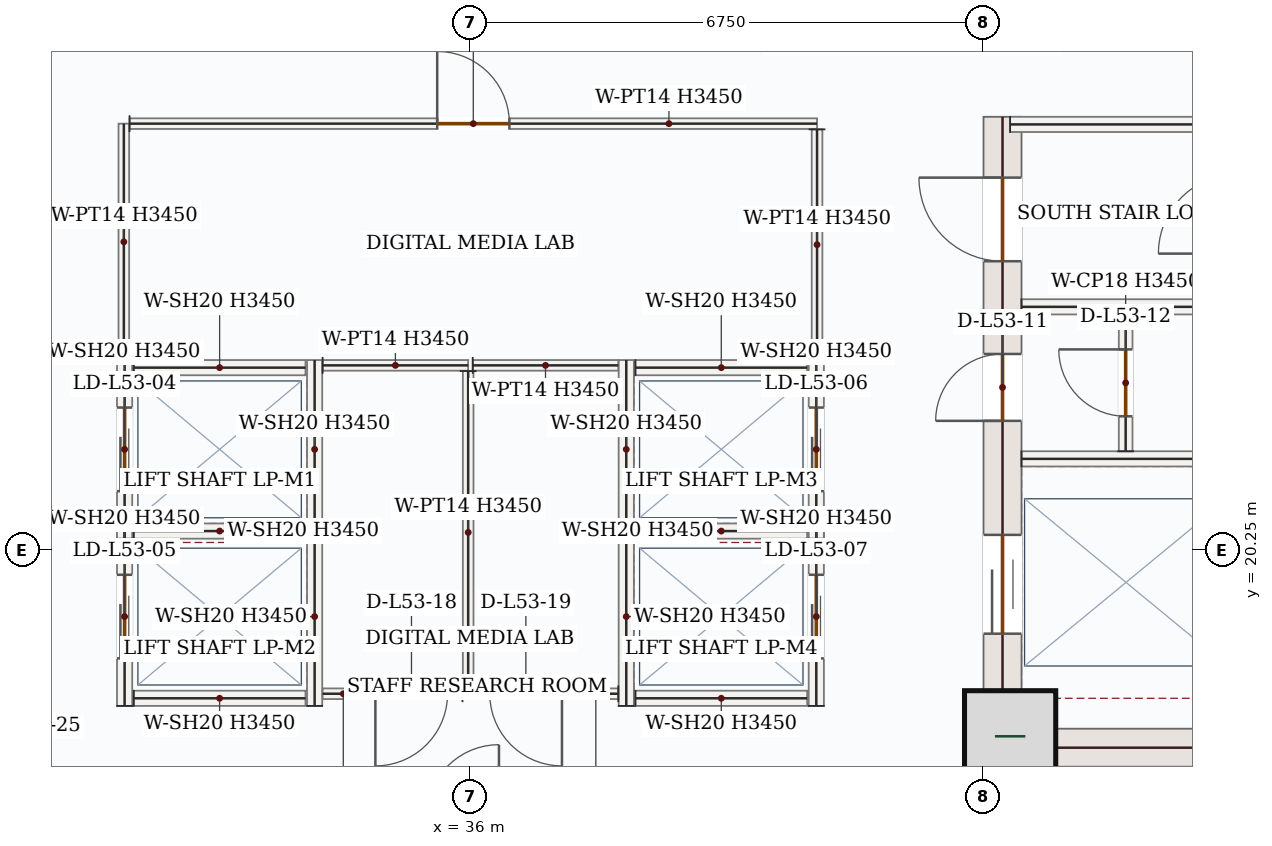
"""IFC4 building model, lengths in metres.
Left out: names, types, materials, properties, quantities, classifications, styles, units other than length and angle.
Written with IfcOpenShell. Run it as: python <this file> out.ifc"""

import sys

from ifc_helpers import new_model, si_unit, direction, frame, frame_2d, origin, origin_2d, place, context, subcontext, project, spatial, rectangle, extrude, source, transform, mapped, element, fill, save


model = new_model("IFC4")
c1 = context("Model", 3, precision=1e-05, world=origin(), true_north=direction((0.0, 1.0)))
c2 = subcontext(c1, "Body", "Model", "MODEL_VIEW")
j1 = project(units=[si_unit("LENGTHUNIT", "METRE"), si_unit("PLANEANGLEUNIT", "RADIAN")], contexts=[c1])
p1 = place(None, origin())
s1 = spatial("IfcSite", under=j1, at=p1, CompositionType="ELEMENT")
p2 = place(p1, origin())
s2 = spatial("IfcBuilding", under=s1, at=p2, CompositionType="ELEMENT")
p3 = place(p2, frame((0.0, 0.0, 225.3)))
s3 = spatial("IfcBuildingStorey", under=s2, at=p3, CompositionType="ELEMENT", Elevation=225.3)
p4 = place(p3, frame((43.0, 17.4, 0.0), z_axis=(0.0, 0.0, 1.0), x_axis=(0.0, 1.0, 0.0)))
e1 = element("IfcWall", 1, at=p4, inside=s3, PredefinedType="SHEAR", context=c2, shape_type="SweptSolid", body=[
    extrude(rectangle(XDim=8.55, YDim=0.5, at=frame_2d((4.275, 0.0))), origin(), (0.0, 0.0, 1.0), 3.45),
])
p5 = place(p4, frame((6.65, 0.0, 0.0)))
e2 = element("IfcOpeningElement", 2, at=p5, cuts=e1, PredefinedType="OPENING", context=c2, shape_type="SweptSolid", body=[
    extrude(rectangle(XDim=1.1, YDim=2.2, at=frame_2d((0.55, 1.1))), frame((0.0, 0.26, 0.0), z_axis=(0.0, -1.0, 0.0), x_axis=(1.0, 0.0, 0.0)), (0.0, 0.0, 1.0), 0.52),
])
p6 = place(p4, frame((1.75, 0.0, 0.0)))
e3 = element("IfcOpeningElement", 3, at=p6, cuts=e1, PredefinedType="OPENING", context=c2, shape_type="SweptSolid", body=[
    extrude(rectangle(XDim=1.3, YDim=2.2, at=frame_2d((0.65, 1.1))), frame((0.0, 0.26, 0.0), z_axis=(0.0, -1.0, 0.0), x_axis=(1.0, 0.0, 0.0)), (0.0, 0.0, 1.0), 0.52),
])
p7 = place(p4, frame((4.55, 0.0, 0.0)))
e4 = element("IfcOpeningElement", 4, at=p7, cuts=e1, PredefinedType="OPENING", context=c2, shape_type="SweptSolid", body=[
    extrude(rectangle(XDim=0.88, YDim=2.1, at=frame_2d((0.44, 1.05))), frame((0.0, 0.26, 0.0), z_axis=(0.0, -1.0, 0.0), x_axis=(1.0, 0.0, 0.0)), (0.0, 0.0, 1.0), 0.52),
])
m1 = source(origin(), c2, "Body", "SweptSolid", [
    extrude(rectangle(XDim=7.0, YDim=0.5, at=frame_2d((3.5, 0.0))), origin(), (0.0, 0.0, 1.0), 3.45),
])
p8 = place(p3, frame((43.25, 17.65, 0.0), z_axis=(0.0, 0.0, 1.0), x_axis=(1.0, 0.0, 0.0)))
e5 = element("IfcWall", 5, at=p8, inside=s3, PredefinedType="SHEAR", context=c2, shape_type="MappedRepresentation", body=[
    mapped(m1, transform((0.0, 0.0, 0.0), x_axis=(1.0, 0.0, 0.0), y_axis=(0.0, 1.0, 0.0), z_axis=(0.0, 0.0, 1.0), scale=1.0)),
])
m2 = source(origin(), c2, "Body", "SweptSolid", [
    extrude(rectangle(XDim=1.2, YDim=1.2, at=origin_2d()), origin(), (0.0, 0.0, 1.0), 3.9),
])
p9 = place(p3, frame((43.1, 17.8, 0.0), z_axis=(0.0, 0.0, 1.0), x_axis=(1.0, 0.0, 0.0)))
e6 = element("IfcColumn", 6, at=p9, inside=s3, PredefinedType="COLUMN", context=c2, shape_type="MappedRepresentation", body=[
    mapped(m2, transform((0.0, 0.0, 0.0), x_axis=(1.0, 0.0, 0.0), y_axis=(0.0, 1.0, 0.0), z_axis=(0.0, 0.0, 1.0), scale=1.0)),
])
m3 = source(origin(), c2, "Body", "SweptSolid", [
    extrude(rectangle(XDim=3.0, YDim=0.2, at=frame_2d((1.5, 0.0))), origin(), (0.0, 0.0, 1.0), 3.45),
])
p10 = place(p3, frame((43.1, 25.85, 0.0), z_axis=(0.0, 0.0, 1.0), x_axis=(1.0, 0.0, 0.0)))
e7 = element("IfcWall", 7, at=p10, inside=s3, PredefinedType="SOLIDWALL", context=c2, shape_type="MappedRepresentation", body=[
    mapped(m3, transform((0.0, 0.0, 0.0), x_axis=(1.0, 0.0, 0.0), y_axis=(0.0, 1.0, 0.0), z_axis=(0.0, 0.0, 1.0), scale=1.0)),
])
m4 = source(origin(), c2, "Body", "SweptSolid", [
    extrude(rectangle(XDim=2.75, YDim=0.2, at=frame_2d((1.375, 0.0))), origin(), (0.0, 0.0, 1.0), 3.45),
])
for number, where, z_axis, x_axis in (
    (8, (43.25, 23.45, 0.0), (0.0, 0.0, 1.0), (1.0, 0.0, 0.0)),
    (9, (43.25, 21.45, 0.0), (0.0, 0.0, 1.0), (1.0, 0.0, 0.0)),
):
    element("IfcWall", number, at=place(p3, frame(where, z_axis=z_axis, x_axis=x_axis)), inside=s3, PredefinedType="SOLIDWALL", context=c2, shape_type="MappedRepresentation", body=[
        mapped(m4, transform((0.0, 0.0, 0.0), x_axis=(1.0, 0.0, 0.0), y_axis=(0.0, 1.0, 0.0), z_axis=(0.0, 0.0, 1.0), scale=1.0)),
    ])
p11 = place(p3, frame((44.62, 21.55, 0.0), z_axis=(0.0, 0.0, 1.0), x_axis=(0.0, 1.0, 0.0)))
e10 = element("IfcWall", 10, at=p11, inside=s3, PredefinedType="PARTITIONING", context=c2, shape_type="SweptSolid", body=[
    extrude(rectangle(XDim=1.8, YDim=0.18, at=frame_2d((0.9, 0.0))), origin(), (0.0, 0.0, 1.0), 3.45),
])
p12 = place(p11, frame((0.46, 0.0, 0.0)))
e11 = element("IfcOpeningElement", 11, at=p12, cuts=e10, PredefinedType="OPENING", context=c2, shape_type="SweptSolid", body=[
    extrude(rectangle(XDim=0.88, YDim=2.1, at=frame_2d((0.44, 1.05))), frame((0.0, 0.1, 0.0), z_axis=(0.0, -1.0, 0.0), x_axis=(1.0, 0.0, 0.0)), (0.0, 0.0, 1.0), 0.2),
])
p13 = place(p3, frame((31.45, 20.4, 0.0), z_axis=(0.0, 0.0, 1.0), x_axis=(0.0, 1.0, 0.0)))
e12 = element("IfcWall", 12, at=p13, inside=s3, PredefinedType="SOLIDWALL", context=c2, shape_type="SweptSolid", body=[
    extrude(rectangle(XDim=2.35, YDim=0.2, at=frame_2d((1.175, 0.0))), origin(), (0.0, 0.0, 1.0), 3.45),
])
p14 = place(p13, frame((0.625, 0.0, 0.0)))
e13 = element("IfcOpeningElement", 13, at=p14, cuts=e12, PredefinedType="OPENING", context=c2, shape_type="SweptSolid", body=[
    extrude(rectangle(XDim=1.1, YDim=2.15, at=frame_2d((0.55, 1.075))), frame((0.0, 0.11, 0.0), z_axis=(0.0, -1.0, 0.0), x_axis=(1.0, 0.0, 0.0)), (0.0, 0.0, 1.0), 0.22),
])
m5 = source(origin(), c2, "Body", "SweptSolid", [
    extrude(rectangle(XDim=2.35, YDim=0.2, at=frame_2d((1.175, 0.0))), origin(), (0.0, 0.0, 1.0), 3.45),
])
p15 = place(p3, frame((33.95, 20.4, 0.0), z_axis=(0.0, 0.0, 1.0), x_axis=(0.0, 1.0, 0.0)))
e14 = element("IfcWall", 14, at=p15, inside=s3, PredefinedType="SOLIDWALL", context=c2, shape_type="MappedRepresentation", body=[
    mapped(m5, transform((0.0, 0.0, 0.0), x_axis=(1.0, 0.0, 0.0), y_axis=(0.0, 1.0, 0.0), z_axis=(0.0, 0.0, 1.0), scale=1.0)),
])
m6 = source(origin(), c2, "Body", "SweptSolid", [
    extrude(rectangle(XDim=2.26, YDim=0.2, at=frame_2d((1.13, 0.0))), origin(), (0.0, 0.0, 1.0), 3.45),
])
for number, where, z_axis, x_axis in (
    (15, (31.57, 20.5, 0.0), (0.0, 0.0, 1.0), (1.0, 0.0, 0.0)),
    (16, (31.57, 22.65, 0.0), (0.0, 0.0, 1.0), (1.0, 0.0, 0.0)),
):
    element("IfcWall", number, at=place(p3, frame(where, z_axis=z_axis, x_axis=x_axis)), inside=s3, PredefinedType="SOLIDWALL", context=c2, shape_type="MappedRepresentation", body=[
        mapped(m6, transform((0.0, 0.0, 0.0), x_axis=(1.0, 0.0, 0.0), y_axis=(0.0, 1.0, 0.0), z_axis=(0.0, 0.0, 1.0), scale=1.0)),
    ])
p16 = place(p3, frame((31.45, 18.2, 0.0), z_axis=(0.0, 0.0, 1.0), x_axis=(0.0, 1.0, 0.0)))
e17 = element("IfcWall", 17, at=p16, inside=s3, PredefinedType="SOLIDWALL", context=c2, shape_type="SweptSolid", body=[
    extrude(rectangle(XDim=2.35, YDim=0.2, at=frame_2d((1.175, 0.0))), origin(), (0.0, 0.0, 1.0), 3.45),
])
p17 = place(p16, frame((0.625, 0.0, 0.0)))
e18 = element("IfcOpeningElement", 18, at=p17, cuts=e17, PredefinedType="OPENING", context=c2, shape_type="SweptSolid", body=[
    extrude(rectangle(XDim=1.1, YDim=2.15, at=frame_2d((0.55, 1.075))), frame((0.0, 0.11, 0.0), z_axis=(0.0, -1.0, 0.0), x_axis=(1.0, 0.0, 0.0)), (0.0, 0.0, 1.0), 0.22),
])
p18 = place(p3, frame((33.95, 18.2, 0.0), z_axis=(0.0, 0.0, 1.0), x_axis=(0.0, 1.0, 0.0)))
e19 = element("IfcWall", 19, at=p18, inside=s3, PredefinedType="SOLIDWALL", context=c2, shape_type="MappedRepresentation", body=[
    mapped(m5, transform((0.0, 0.0, 0.0), x_axis=(1.0, 0.0, 0.0), y_axis=(0.0, 1.0, 0.0), z_axis=(0.0, 0.0, 1.0), scale=1.0)),
])
p19 = place(p3, frame((31.57, 18.3, 0.0), z_axis=(0.0, 0.0, 1.0), x_axis=(1.0, 0.0, 0.0)))
e20 = element("IfcWall", 20, at=p19, inside=s3, PredefinedType="SOLIDWALL", context=c2, shape_type="MappedRepresentation", body=[
    mapped(m6, transform((0.0, 0.0, 0.0), x_axis=(1.0, 0.0, 0.0), y_axis=(0.0, 1.0, 0.0), z_axis=(0.0, 0.0, 1.0), scale=1.0)),
])
p20 = place(p3, frame((38.05, 20.4, 0.0), z_axis=(0.0, 0.0, 1.0), x_axis=(0.0, 1.0, 0.0)))
e21 = element("IfcWall", 21, at=p20, inside=s3, PredefinedType="SOLIDWALL", context=c2, shape_type="MappedRepresentation", body=[
    mapped(m5, transform((0.0, 0.0, 0.0), x_axis=(1.0, 0.0, 0.0), y_axis=(0.0, 1.0, 0.0), z_axis=(0.0, 0.0, 1.0), scale=1.0)),
])
p21 = place(p3, frame((40.55, 20.4, 0.0), z_axis=(0.0, 0.0, 1.0), x_axis=(0.0, 1.0, 0.0)))
e22 = element("IfcWall", 22, at=p21, inside=s3, PredefinedType="SOLIDWALL", context=c2, shape_type="SweptSolid", body=[
    extrude(rectangle(XDim=2.35, YDim=0.2, at=frame_2d((1.175, 0.0))), origin(), (0.0, 0.0, 1.0), 3.45),
])
p22 = place(p21, frame((0.625, 0.0, 0.0)))
e23 = element("IfcOpeningElement", 23, at=p22, cuts=e22, PredefinedType="OPENING", context=c2, shape_type="SweptSolid", body=[
    extrude(rectangle(XDim=1.1, YDim=2.15, at=frame_2d((0.55, 1.075))), frame((0.0, 0.11, 0.0), z_axis=(0.0, -1.0, 0.0), x_axis=(1.0, 0.0, 0.0)), (0.0, 0.0, 1.0), 0.22),
])
for number, where, z_axis, x_axis in (
    (24, (38.17, 20.5, 0.0), (0.0, 0.0, 1.0), (1.0, 0.0, 0.0)),
    (25, (38.17, 22.65, 0.0), (0.0, 0.0, 1.0), (1.0, 0.0, 0.0)),
):
    element("IfcWall", number, at=place(p3, frame(where, z_axis=z_axis, x_axis=x_axis)), inside=s3, PredefinedType="SOLIDWALL", context=c2, shape_type="MappedRepresentation", body=[
        mapped(m6, transform((0.0, 0.0, 0.0), x_axis=(1.0, 0.0, 0.0), y_axis=(0.0, 1.0, 0.0), z_axis=(0.0, 0.0, 1.0), scale=1.0)),
    ])
p23 = place(p3, frame((38.05, 18.2, 0.0), z_axis=(0.0, 0.0, 1.0), x_axis=(0.0, 1.0, 0.0)))
e26 = element("IfcWall", 26, at=p23, inside=s3, PredefinedType="SOLIDWALL", context=c2, shape_type="MappedRepresentation", body=[
    mapped(m5, transform((0.0, 0.0, 0.0), x_axis=(1.0, 0.0, 0.0), y_axis=(0.0, 1.0, 0.0), z_axis=(0.0, 0.0, 1.0), scale=1.0)),
])
p24 = place(p3, frame((40.55, 18.2, 0.0), z_axis=(0.0, 0.0, 1.0), x_axis=(0.0, 1.0, 0.0)))
e27 = element("IfcWall", 27, at=p24, inside=s3, PredefinedType="SOLIDWALL", context=c2, shape_type="SweptSolid", body=[
    extrude(rectangle(XDim=2.35, YDim=0.2, at=frame_2d((1.175, 0.0))), origin(), (0.0, 0.0, 1.0), 3.45),
])
p25 = place(p24, frame((0.625, 0.0, 0.0)))
e28 = element("IfcOpeningElement", 28, at=p25, cuts=e27, PredefinedType="OPENING", context=c2, shape_type="SweptSolid", body=[
    extrude(rectangle(XDim=1.1, YDim=2.15, at=frame_2d((0.55, 1.075))), frame((0.0, 0.11, 0.0), z_axis=(0.0, -1.0, 0.0), x_axis=(1.0, 0.0, 0.0)), (0.0, 0.0, 1.0), 0.22),
])
p26 = place(p3, frame((38.17, 18.3, 0.0), z_axis=(0.0, 0.0, 1.0), x_axis=(1.0, 0.0, 0.0)))
e29 = element("IfcWall", 29, at=p26, inside=s3, PredefinedType="SOLIDWALL", context=c2, shape_type="MappedRepresentation", body=[
    mapped(m6, transform((0.0, 0.0, 0.0), x_axis=(1.0, 0.0, 0.0), y_axis=(0.0, 1.0, 0.0), z_axis=(0.0, 0.0, 1.0), scale=1.0)),
])
m7 = source(origin(), c2, "Body", "SweptSolid", [
    extrude(rectangle(XDim=1.915, YDim=0.14, at=frame_2d((0.958, 0.0))), origin(), (0.0, 0.0, 1.0), 3.45),
])
p27 = place(p3, frame((34.055, 22.68, 0.0), z_axis=(0.0, 0.0, 1.0), x_axis=(1.0, 0.0, 0.0)))
e30 = element("IfcWall", 30, at=p27, inside=s3, PredefinedType="PARTITIONING", context=c2, shape_type="MappedRepresentation", body=[
    mapped(m7, transform((0.0, 0.0, 0.0), x_axis=(1.0, 0.0, 0.0), y_axis=(0.0, 1.0, 0.0), z_axis=(0.0, 0.0, 1.0), scale=1.0)),
])
m8 = source(origin(), c2, "Body", "SweptSolid", [
    extrude(rectangle(XDim=4.245, YDim=0.14, at=frame_2d((2.123, 0.0))), origin(), (0.0, 0.0, 1.0), 3.45),
])
p28 = place(p3, frame((35.97, 22.605, 0.0), z_axis=(0.0, 0.0, 1.0), x_axis=(0.0, -1.0, 0.0)))
e31 = element("IfcWall", 31, at=p28, inside=s3, PredefinedType="PARTITIONING", context=c2, shape_type="MappedRepresentation", body=[
    mapped(m8, transform((0.0, 0.0, 0.0), x_axis=(1.0, 0.0, 0.0), y_axis=(0.0, 1.0, 0.0), z_axis=(0.0, 0.0, 1.0), scale=1.0)),
])
p29 = place(p3, frame((35.895, 18.36, 0.0), z_axis=(0.0, 0.0, 1.0), x_axis=(-1.0, 0.0, 0.0)))
e32 = element("IfcWall", 32, at=p29, inside=s3, PredefinedType="PARTITIONING", context=c2, shape_type="SweptSolid", body=[
    extrude(rectangle(XDim=1.84, YDim=0.14, at=frame_2d((0.92, 0.0))), origin(), (0.0, 0.0, 1.0), 3.45),
])
p30 = place(p29, frame((0.196, 0.0, 0.0)))
e33 = element("IfcOpeningElement", 33, at=p30, cuts=e32, PredefinedType="OPENING", context=c2, shape_type="SweptSolid", body=[
    extrude(rectangle(XDim=0.95, YDim=2.15, at=frame_2d((0.475, 1.075))), frame((0.0, 0.08, 0.0), z_axis=(0.0, -1.0, 0.0), x_axis=(1.0, 0.0, 0.0)), (0.0, 0.0, 1.0), 0.16),
])
p31 = place(p3, frame((36.03, 22.68, 0.0), z_axis=(0.0, 0.0, 1.0), x_axis=(1.0, 0.0, 0.0)))
e34 = element("IfcWall", 34, at=p31, inside=s3, PredefinedType="PARTITIONING", context=c2, shape_type="MappedRepresentation", body=[
    mapped(m7, transform((0.0, 0.0, 0.0), x_axis=(1.0, 0.0, 0.0), y_axis=(0.0, 1.0, 0.0), z_axis=(0.0, 0.0, 1.0), scale=1.0)),
])
p32 = place(p3, frame((37.945, 18.36, 0.0), z_axis=(0.0, 0.0, 1.0), x_axis=(-1.0, 0.0, 0.0)))
e35 = element("IfcWall", 35, at=p32, inside=s3, PredefinedType="PARTITIONING", context=c2, shape_type="SweptSolid", body=[
    extrude(rectangle(XDim=1.9, YDim=0.14, at=frame_2d((0.95, 0.0))), origin(), (0.0, 0.0, 1.0), 3.45),
])
p33 = place(p32, frame((0.741, 0.0, 0.0)))
e36 = element("IfcOpeningElement", 36, at=p33, cuts=e35, PredefinedType="OPENING", context=c2, shape_type="SweptSolid", body=[
    extrude(rectangle(XDim=0.95, YDim=2.15, at=frame_2d((0.475, 1.075))), frame((0.0, 0.08, 0.0), z_axis=(0.0, -1.0, 0.0), x_axis=(1.0, 0.0, 0.0)), (0.0, 0.0, 1.0), 0.16),
])
m9 = source(origin(), c2, "Body", "SweptSolid", [
    extrude(rectangle(XDim=3.11, YDim=0.14, at=frame_2d((1.555, 0.0))), origin(), (0.0, 0.0, 1.0), 3.45),
])
p34 = place(p3, frame((31.44, 22.75, 0.0), z_axis=(0.0, 0.0, 1.0), x_axis=(0.0, 1.0, 0.0)))
e37 = element("IfcWall", 37, at=p34, inside=s3, PredefinedType="PARTITIONING", context=c2, shape_type="MappedRepresentation", body=[
    mapped(m9, transform((0.0, 0.0, 0.0), x_axis=(1.0, 0.0, 0.0), y_axis=(0.0, 1.0, 0.0), z_axis=(0.0, 0.0, 1.0), scale=1.0)),
])
p35 = place(p3, frame((31.515, 25.86, 0.0), z_axis=(0.0, 0.0, 1.0), x_axis=(1.0, 0.0, 0.0)))
e38 = element("IfcWall", 38, at=p35, inside=s3, PredefinedType="PARTITIONING", context=c2, shape_type="SweptSolid", body=[
    extrude(rectangle(XDim=9.045, YDim=0.14, at=frame_2d((4.522, 0.0))), origin(), (0.0, 0.0, 1.0), 3.45),
])
p36 = place(p35, frame((4.048, 0.0, 0.0)))
e39 = element("IfcOpeningElement", 39, at=p36, cuts=e38, PredefinedType="OPENING", context=c2, shape_type="SweptSolid", body=[
    extrude(rectangle(XDim=0.95, YDim=2.15, at=frame_2d((0.475, 1.075))), frame((0.0, 0.08, 0.0), z_axis=(0.0, -1.0, 0.0), x_axis=(1.0, 0.0, 0.0)), (0.0, 0.0, 1.0), 0.16),
])
m10 = source(origin(), c2, "Body", "SweptSolid", [
    extrude(rectangle(XDim=3.035, YDim=0.14, at=frame_2d((1.518, 0.0))), origin(), (0.0, 0.0, 1.0), 3.45),
])
p37 = place(p3, frame((40.56, 25.785, 0.0), z_axis=(0.0, 0.0, 1.0), x_axis=(0.0, -1.0, 0.0)))
e40 = element("IfcWall", 40, at=p37, inside=s3, PredefinedType="PARTITIONING", context=c2, shape_type="MappedRepresentation", body=[
    mapped(m10, transform((0.0, 0.0, 0.0), x_axis=(1.0, 0.0, 0.0), y_axis=(0.0, 1.0, 0.0), z_axis=(0.0, 0.0, 1.0), scale=1.0)),
])
m11 = source(origin(), c2, "Body", "SweptSolid", [
    extrude(rectangle(XDim=1.1, YDim=2.2, at=frame_2d((0.55, 1.1))), frame((0.0, 0.025, 0.0), z_axis=(0.0, -1.0, 0.0), x_axis=(1.0, 0.0, 0.0)), (0.0, 0.0, 1.0), 0.05),
])
p38 = place(p5, origin())
e41 = element("IfcDoor", 41, at=p38, inside=s3, OperationType="SINGLE_SWING_RIGHT", PredefinedType="DOOR", context=c2, shape_type="MappedRepresentation", body=[
    mapped(m11, transform((0.0, 0.0, 0.0), x_axis=(1.0, 0.0, 0.0), y_axis=(0.0, 1.0, 0.0), z_axis=(0.0, 0.0, 1.0), scale=1.0)),
])
fill(e2, e41)
m12 = source(origin(), c2, "Body", "SweptSolid", [
    extrude(rectangle(XDim=1.3, YDim=2.2, at=frame_2d((0.65, 1.1))), frame((0.0, 0.025, 0.0), z_axis=(0.0, -1.0, 0.0), x_axis=(1.0, 0.0, 0.0)), (0.0, 0.0, 1.0), 0.05),
])
p39 = place(p6, origin())
e42 = element("IfcDoor", 42, at=p39, inside=s3, OperationType="DOUBLE_DOOR_SLIDING", PredefinedType="DOOR", context=c2, shape_type="MappedRepresentation", body=[
    mapped(m12, transform((0.0, 0.0, 0.0), x_axis=(1.0, 0.0, 0.0), y_axis=(0.0, 1.0, 0.0), z_axis=(0.0, 0.0, 1.0), scale=1.0)),
])
fill(e3, e42)
m13 = source(origin(), c2, "Body", "SweptSolid", [
    extrude(rectangle(XDim=0.88, YDim=2.1, at=frame_2d((0.44, 1.05))), frame((0.0, 0.025, 0.0), z_axis=(0.0, -1.0, 0.0), x_axis=(1.0, 0.0, 0.0)), (0.0, 0.0, 1.0), 0.05),
])
p40 = place(p7, origin())
e43 = element("IfcDoor", 43, at=p40, inside=s3, OperationType="SINGLE_SWING_LEFT", PredefinedType="DOOR", context=c2, shape_type="MappedRepresentation", body=[
    mapped(m13, transform((0.0, 0.0, 0.0), x_axis=(1.0, 0.0, 0.0), y_axis=(0.0, 1.0, 0.0), z_axis=(0.0, 0.0, 1.0), scale=1.0)),
])
fill(e4, e43)
p41 = place(p12, origin())
e44 = element("IfcDoor", 44, at=p41, inside=s3, OperationType="SINGLE_SWING_RIGHT", PredefinedType="DOOR", context=c2, shape_type="MappedRepresentation", body=[
    mapped(m13, transform((0.0, 0.0, 0.0), x_axis=(1.0, 0.0, 0.0), y_axis=(0.0, 1.0, 0.0), z_axis=(0.0, 0.0, 1.0), scale=1.0)),
])
fill(e11, e44)
m14 = source(origin(), c2, "Body", "SweptSolid", [
    extrude(rectangle(XDim=1.1, YDim=2.15, at=frame_2d((0.55, 1.075))), frame((0.0, 0.025, 0.0), z_axis=(0.0, -1.0, 0.0), x_axis=(1.0, 0.0, 0.0)), (0.0, 0.0, 1.0), 0.05),
])
p42 = place(p14, origin())
e45 = element("IfcDoor", 45, at=p42, inside=s3, OperationType="DOUBLE_DOOR_SLIDING", PredefinedType="DOOR", context=c2, shape_type="MappedRepresentation", body=[
    mapped(m14, transform((0.0, 0.0, 0.0), x_axis=(1.0, 0.0, 0.0), y_axis=(0.0, 1.0, 0.0), z_axis=(0.0, 0.0, 1.0), scale=1.0)),
])
fill(e13, e45)
p43 = place(p17, origin())
e46 = element("IfcDoor", 46, at=p43, inside=s3, OperationType="DOUBLE_DOOR_SLIDING", PredefinedType="DOOR", context=c2, shape_type="MappedRepresentation", body=[
    mapped(m14, transform((0.0, 0.0, 0.0), x_axis=(1.0, 0.0, 0.0), y_axis=(0.0, 1.0, 0.0), z_axis=(0.0, 0.0, 1.0), scale=1.0)),
])
fill(e18, e46)
p44 = place(p22, origin())
e47 = element("IfcDoor", 47, at=p44, inside=s3, OperationType="DOUBLE_DOOR_SLIDING", PredefinedType="DOOR", context=c2, shape_type="MappedRepresentation", body=[
    mapped(m14, transform((0.0, 0.0, 0.0), x_axis=(1.0, 0.0, 0.0), y_axis=(0.0, 1.0, 0.0), z_axis=(0.0, 0.0, 1.0), scale=1.0)),
])
fill(e23, e47)
p45 = place(p25, origin())
e48 = element("IfcDoor", 48, at=p45, inside=s3, OperationType="DOUBLE_DOOR_SLIDING", PredefinedType="DOOR", context=c2, shape_type="MappedRepresentation", body=[
    mapped(m14, transform((0.0, 0.0, 0.0), x_axis=(1.0, 0.0, 0.0), y_axis=(0.0, 1.0, 0.0), z_axis=(0.0, 0.0, 1.0), scale=1.0)),
])
fill(e28, e48)
m15 = source(origin(), c2, "Body", "SweptSolid", [
    extrude(rectangle(XDim=0.95, YDim=2.15, at=frame_2d((0.475, 1.075))), frame((0.0, 0.025, 0.0), z_axis=(0.0, -1.0, 0.0), x_axis=(1.0, 0.0, 0.0)), (0.0, 0.0, 1.0), 0.05),
])
p46 = place(p36, origin())
e49 = element("IfcDoor", 49, at=p46, inside=s3, OperationType="SINGLE_SWING_LEFT", PredefinedType="DOOR", context=c2, shape_type="MappedRepresentation", body=[
    mapped(m15, transform((0.0, 0.0, 0.0), x_axis=(1.0, 0.0, 0.0), y_axis=(0.0, 1.0, 0.0), z_axis=(0.0, 0.0, 1.0), scale=1.0)),
])
fill(e39, e49)
p47 = place(p30, origin())
e50 = element("IfcDoor", 50, at=p47, inside=s3, OperationType="SINGLE_SWING_RIGHT", PredefinedType="DOOR", context=c2, shape_type="MappedRepresentation", body=[
    mapped(m15, transform((0.0, 0.0, 0.0), x_axis=(1.0, 0.0, 0.0), y_axis=(0.0, 1.0, 0.0), z_axis=(0.0, 0.0, 1.0), scale=1.0)),
])
fill(e33, e50)
p48 = place(p33, origin())
e51 = element("IfcDoor", 51, at=p48, inside=s3, OperationType="SINGLE_SWING_LEFT", PredefinedType="DOOR", context=c2, shape_type="MappedRepresentation", body=[
    mapped(m15, transform((0.0, 0.0, 0.0), x_axis=(1.0, 0.0, 0.0), y_axis=(0.0, 1.0, 0.0), z_axis=(0.0, 0.0, 1.0), scale=1.0)),
])
fill(e36, e51)
save(model, sys.argv[1])
